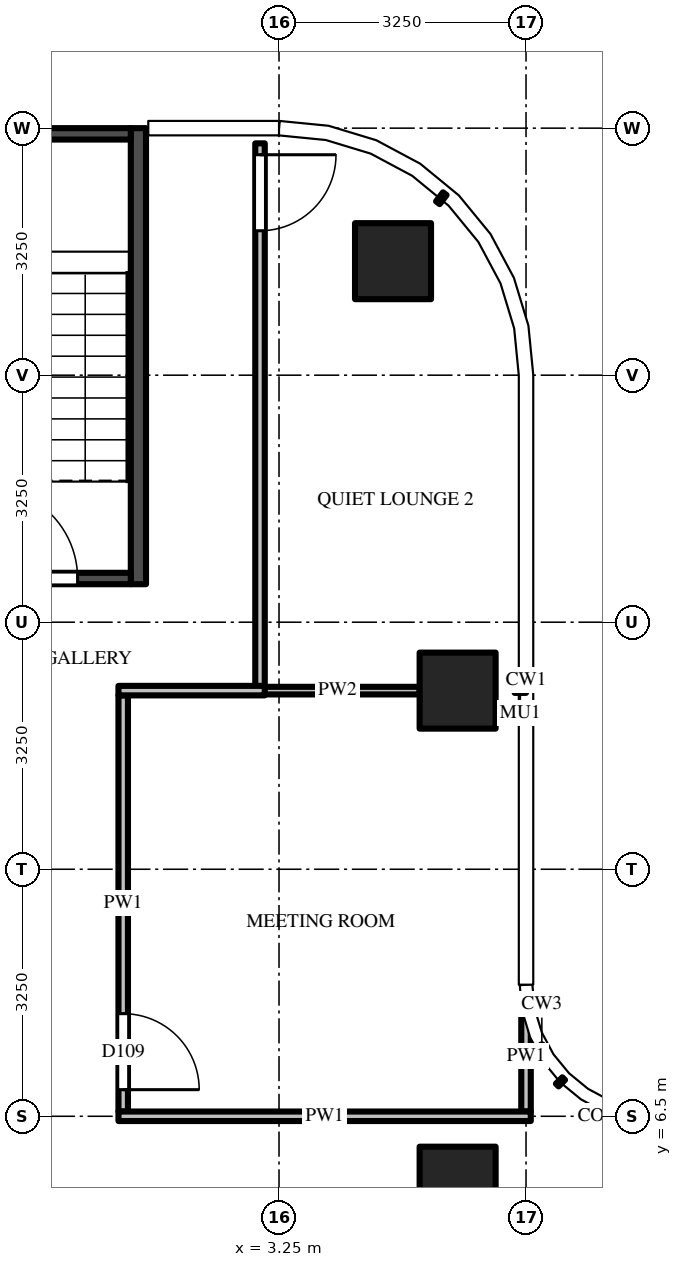
"""IFC4 building model, lengths in metres.
Left out: names, types, materials, properties, quantities, classifications, styles, units other than length and angle.
Written with IfcOpenShell. Run it as: python <this file> out.ifc"""

import sys

from ifc_helpers import new_model, si_unit, direction, frame, frame_2d, origin, origin_2d, place, context, subcontext, project, spatial, rectangle, extrude, source, transform, mapped, element, fill, save


model = new_model("IFC4")
c1 = context("Model", 3, precision=1e-05, world=origin(), true_north=direction((0.0, 1.0)))
c2 = subcontext(c1, "Body", "Model", "MODEL_VIEW")
j1 = project(units=[si_unit("LENGTHUNIT", "METRE"), si_unit("PLANEANGLEUNIT", "RADIAN")], contexts=[c1])
p1 = place(None, origin())
s1 = spatial("IfcSite", under=j1, at=p1, CompositionType="ELEMENT")
p2 = place(p1, origin())
s2 = spatial("IfcBuilding", under=s1, at=p2, CompositionType="ELEMENT")
p3 = place(p2, frame((0.0, 0.0, 326.2)))
s3 = spatial("IfcBuildingStorey", under=s2, at=p3, CompositionType="ELEMENT", Elevation=326.2)
m1 = source(origin(), c2, "Body", "SweptSolid", [
    extrude(rectangle(XDim=1.0, YDim=1.0, at=origin_2d()), origin(), (0.0, 0.0, 1.0), 3.9),
])
for number, where, z_axis, x_axis in (
    (1, (5.6, 12.1, 0.0), (0.0, 0.0, 1.0), (1.0, 0.0, 0.0)),
    (2, (4.75, 17.75, 0.0), (0.0, 0.0, 1.0), (1.0, 0.0, 0.0)),
    (3, (5.6, 5.6, 0.0), (0.0, 0.0, 1.0), (1.0, 0.0, 0.0)),
):
    element("IfcColumn", number, at=place(p3, frame(where, z_axis=z_axis, x_axis=x_axis)), inside=s3, PredefinedType="COLUMN", context=c2, shape_type="MappedRepresentation", body=[
        mapped(m1, transform((0.0, 0.0, 0.0))),
    ])
m2 = source(origin(), c2, "Body", "SweptSolid", [
    extrude(rectangle(XDim=6.0, YDim=0.2, at=frame_2d((3.0, 0.0))), origin(), (0.0, 0.0, 1.0), 3.5),
])
p4 = place(p3, frame((1.4, 13.5, 0.0), z_axis=(0.0, 0.0, 1.0), x_axis=(0.0, 1.0, 0.0)))
e4 = element("IfcWall", 4, at=p4, inside=s3, PredefinedType="SHEAR", context=c2, shape_type="MappedRepresentation", body=[
    mapped(m2, transform((0.0, 0.0, 0.0))),
])
m3 = source(origin(), c2, "Body", "SweptSolid", [
    extrude(rectangle(XDim=2.6, YDim=0.15, at=frame_2d((1.3, 0.0))), origin(), (0.0, 0.0, 1.0), 3.5),
])
p5 = place(p3, frame((-1.3, 13.575, 0.0), z_axis=(0.0, 0.0, 1.0), x_axis=(1.0, 0.0, 0.0)))
e5 = element("IfcWall", 5, at=p5, inside=s3, PredefinedType="SHEAR", context=c2, shape_type="MappedRepresentation", body=[
    mapped(m3, transform((0.0, 0.0, 0.0))),
])
m4 = source(origin(), c2, "Body", "SweptSolid", [
    extrude(rectangle(XDim=1.2, YDim=2.1, at=frame_2d((0.6, 1.05))), frame((0.0, 0.085, 0.0), z_axis=(0.0, -1.0, 0.0), x_axis=(1.0, 0.0, 0.0)), (0.0, 0.0, 1.0), 0.17),
])
p6 = place(p5, frame((0.7, 0.0, 0.0)))
e6 = element("IfcOpeningElement", 6, at=p6, cuts=e5, PredefinedType="OPENING", context=c2, shape_type="MappedRepresentation", body=[
    mapped(m4, transform((0.0, 0.0, 0.0))),
])
p7 = place(p3, frame((-1.3, 19.425, 0.0), z_axis=(0.0, 0.0, 1.0), x_axis=(1.0, 0.0, 0.0)))
e7 = element("IfcWall", 7, at=p7, inside=s3, PredefinedType="SHEAR", context=c2, shape_type="MappedRepresentation", body=[
    mapped(m3, transform((0.0, 0.0, 0.0))),
])
m5 = source(origin(), c2, "Body", "SweptSolid", [
    extrude(rectangle(XDim=5.475, YDim=0.125, at=frame_2d((2.738, 0.0))), origin(), (0.0, 0.0, 1.0), 2.718),
])
p8 = place(p3, frame((1.2, 12.038, 0.0), z_axis=(0.0, 0.0, 1.0), x_axis=(0.0, -1.0, 0.0)))
e8 = element("IfcWall", 8, at=p8, inside=s3, PredefinedType="PARTITIONING", context=c2, shape_type="MappedRepresentation", body=[
    mapped(m5, transform((0.0, 0.0, 0.0))),
])
m6 = source(origin(), c2, "Body", "SweptSolid", [
    extrude(rectangle(XDim=1.0, YDim=2.1, at=frame_2d((0.5, 1.05))), frame((0.0, 0.073, 0.0), z_axis=(0.0, -1.0, 0.0), x_axis=(1.0, 0.0, 0.0)), (0.0, 0.0, 1.0), 0.145),
])
p9 = place(p8, frame((4.188, 0.0, 0.0)))
e9 = element("IfcOpeningElement", 9, at=p9, cuts=e8, PredefinedType="OPENING", context=c2, shape_type="MappedRepresentation", body=[
    mapped(m6, transform((0.0, 0.0, 0.0))),
])
m7 = source(origin(), c2, "Body", "SweptSolid", [
    extrude(rectangle(XDim=7.15, YDim=0.125, at=frame_2d((3.575, 0.0))), origin(), (0.0, 0.0, 1.0), 2.58),
])
p10 = place(p3, frame((3.0, 19.3, 0.0), z_axis=(0.0, 0.0, 1.0), x_axis=(0.0, -1.0, 0.0)))
e10 = element("IfcWall", 10, at=p10, inside=s3, PredefinedType="PARTITIONING", context=c2, shape_type="MappedRepresentation", body=[
    mapped(m7, transform((0.0, 0.0, 0.0))),
])
p11 = place(p10, frame((0.15, 0.0, 0.0)))
e11 = element("IfcOpeningElement", 11, at=p11, cuts=e10, PredefinedType="OPENING", context=c2, shape_type="MappedRepresentation", body=[
    mapped(m6, transform((0.0, 0.0, 0.0))),
])
m8 = source(origin(), c2, "Body", "SweptSolid", [
    extrude(rectangle(XDim=1.469, YDim=0.125, at=frame_2d((0.734, 0.0))), origin(), (0.0, 0.0, 1.0), 3.5),
])
p12 = place(p3, frame((6.5, 6.562, 0.0), z_axis=(0.0, 0.0, 1.0), x_axis=(0.0, 1.0, 0.0)))
e12 = element("IfcWall", 12, at=p12, inside=s3, PredefinedType="PARTITIONING", context=c2, shape_type="MappedRepresentation", body=[
    mapped(m8, transform((0.0, 0.0, 0.0))),
])
m9 = source(origin(), c2, "Body", "SweptSolid", [
    extrude(rectangle(XDim=5.425, YDim=0.125, at=frame_2d((2.712, 0.0))), origin(), (0.0, 0.0, 1.0), 2.58),
])
p13 = place(p3, frame((1.137, 6.5, 0.0), z_axis=(0.0, 0.0, 1.0), x_axis=(1.0, 0.0, 0.0)))
e13 = element("IfcWall", 13, at=p13, inside=s3, PredefinedType="PARTITIONING", context=c2, shape_type="MappedRepresentation", body=[
    mapped(m9, transform((0.0, 0.0, 0.0))),
])
m10 = source(origin(), c2, "Body", "SweptSolid", [
    extrude(rectangle(XDim=2.163, YDim=0.1, at=frame_2d((1.081, 0.0))), origin(), (0.0, 0.0, 1.0), 2.718),
])
p14 = place(p3, frame((2.938, 12.1, 0.0), z_axis=(0.0, 0.0, 1.0), x_axis=(1.0, 0.0, 0.0)))
e14 = element("IfcWall", 14, at=p14, inside=s3, PredefinedType="PARTITIONING", context=c2, shape_type="MappedRepresentation", body=[
    mapped(m10, transform((0.0, 0.0, 0.0))),
])
m11 = source(origin(), c2, "Body", "SweptSolid", [
    extrude(rectangle(XDim=1.925, YDim=0.125, at=frame_2d((0.962, 0.0))), origin(), (0.0, 0.0, 1.0), 2.718),
])
p15 = place(p3, frame((3.062, 12.1, 0.0), z_axis=(0.0, 0.0, 1.0), x_axis=(-1.0, 0.0, 0.0)))
e15 = element("IfcWall", 15, at=p15, inside=s3, PredefinedType="PARTITIONING", context=c2, shape_type="MappedRepresentation", body=[
    mapped(m11, transform((0.0, 0.0, 0.0))),
])
m12 = source(origin(), c2, "Body", "SweptSolid", [
    extrude(rectangle(XDim=1.2, YDim=2.1, at=frame_2d((0.6, 1.05))), frame((0.0, 0.025, 0.0), z_axis=(0.0, -1.0, 0.0), x_axis=(1.0, 0.0, 0.0)), (0.0, 0.0, 1.0), 0.05),
])
p16 = place(p6, origin())
e16 = element("IfcDoor", 16, at=p16, inside=s3, OperationType="SINGLE_SWING_LEFT", PredefinedType="DOOR", context=c2, shape_type="MappedRepresentation", body=[
    mapped(m12, transform((0.0, 0.0, 0.0))),
])
fill(e6, e16)
m13 = source(origin(), c2, "Body", "SweptSolid", [
    extrude(rectangle(XDim=1.0, YDim=2.1, at=frame_2d((0.5, 1.05))), frame((0.0, 0.025, 0.0), z_axis=(0.0, -1.0, 0.0), x_axis=(1.0, 0.0, 0.0)), (0.0, 0.0, 1.0), 0.05),
])
p17 = place(p9, origin())
e17 = element("IfcDoor", 17, at=p17, inside=s3, OperationType="SINGLE_SWING_RIGHT", PredefinedType="DOOR", context=c2, shape_type="MappedRepresentation", body=[
    mapped(m13, transform((0.0, 0.0, 0.0))),
])
fill(e9, e17)
p18 = place(p11, origin())
e18 = element("IfcDoor", 18, at=p18, inside=s3, OperationType="SINGLE_SWING_LEFT", PredefinedType="DOOR", context=c2, shape_type="MappedRepresentation", body=[
    mapped(m13, transform((0.0, 0.0, 0.0))),
])
fill(e11, e18)
save(model, sys.argv[1])
